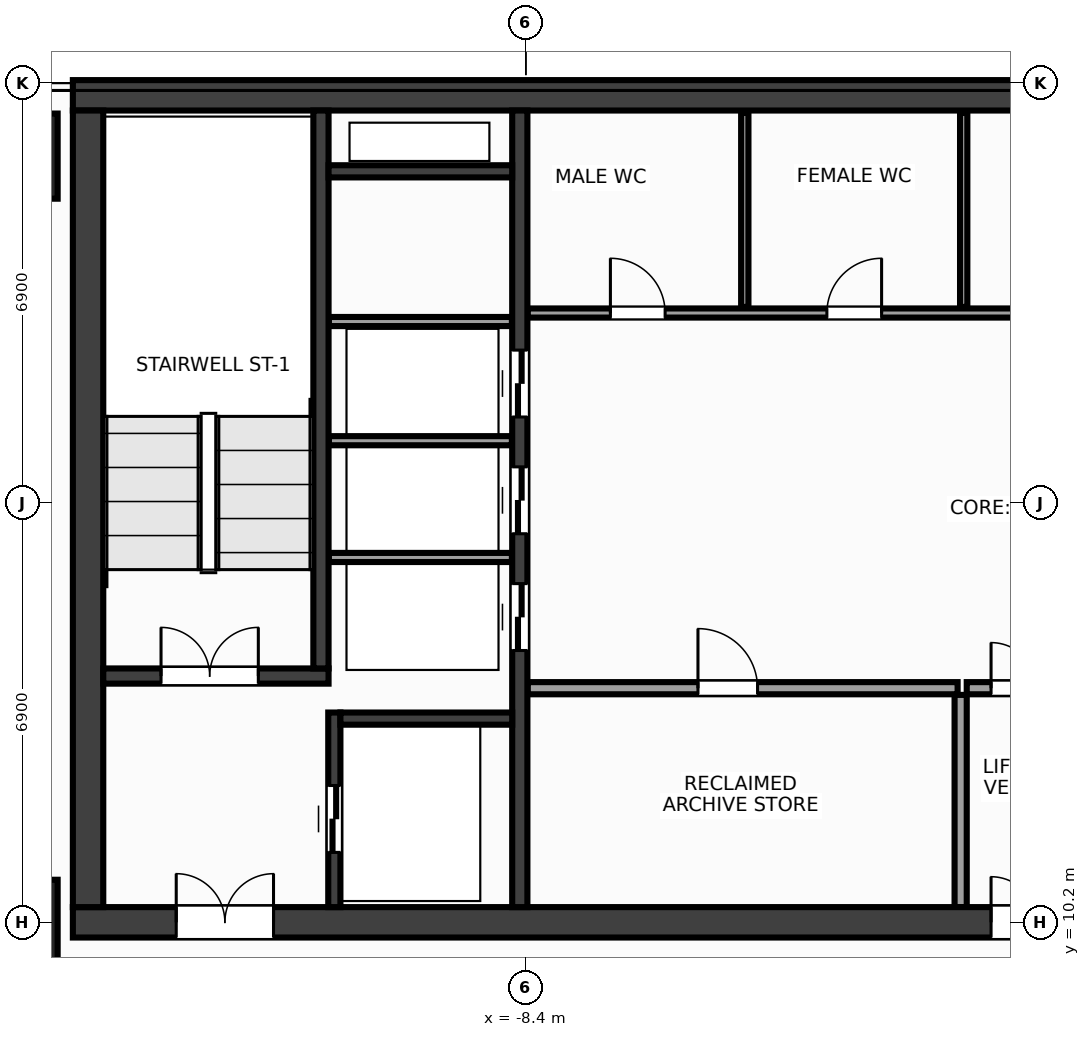
"""IFC4 building model, lengths in metres.
Left out: names, types, materials, properties, quantities, classifications, styles, units other than length and angle.
Written with IfcOpenShell. Run it as: python <this file> out.ifc"""

import sys

from ifc_helpers import new_model, si_unit, direction, frame, frame_2d, origin, origin_2d, place, context, subcontext, project, spatial, rectangle, extrude, source, transform, mapped, element, fill, save


model = new_model("IFC4")
c1 = context("Model", 3, precision=1e-05, world=origin(), true_north=direction((0.0, 1.0)))
c2 = subcontext(c1, "Body", "Model", "MODEL_VIEW")
j1 = project(units=[si_unit("LENGTHUNIT", "METRE"), si_unit("PLANEANGLEUNIT", "RADIAN")], contexts=[c1])
p1 = place(None, origin())
s1 = spatial("IfcSite", under=j1, at=p1, CompositionType="ELEMENT")
p2 = place(p1, origin())
s2 = spatial("IfcBuilding", under=s1, at=p2, CompositionType="ELEMENT")
p3 = place(p2, frame((0.0, 0.0, 196.4)))
s3 = spatial("IfcBuildingStorey", under=s2, at=p3, CompositionType="ELEMENT", Elevation=196.4)
m1 = source(origin(), c2, "Body", "SweptSolid", [
    extrude(rectangle(XDim=31.7, YDim=0.5, at=frame_2d((15.85, 0.0))), origin(), (0.0, 0.0, 1.0), 3.6),
])
p4 = place(p3, frame((-15.85, 23.8, 0.0), z_axis=(0.0, 0.0, 1.0), x_axis=(1.0, 0.0, 0.0)))
e1 = element("IfcWall", 1, at=p4, inside=s3, PredefinedType="SHEAR", context=c2, shape_type="MappedRepresentation", body=[
    mapped(m1, transform((0.0, 0.0, 0.0), x_axis=(1.0, 0.0, 0.0), y_axis=(0.0, 1.0, 0.0), z_axis=(0.0, 0.0, 1.0), scale=1.0)),
])
p5 = place(p3, frame((-15.85, 10.2, 0.0), z_axis=(0.0, 0.0, 1.0), x_axis=(1.0, 0.0, 0.0)))
e2 = element("IfcWall", 2, at=p5, inside=s3, PredefinedType="SHEAR", context=c2, shape_type="MappedRepresentation", body=[
    mapped(m1, transform((0.0, 0.0, 0.0), x_axis=(1.0, 0.0, 0.0), y_axis=(0.0, 1.0, 0.0), z_axis=(0.0, 0.0, 1.0), scale=1.0)),
])
p6 = place(p5, frame((1.7, 0.0, 0.0)))
e3 = element("IfcOpeningElement", 3, at=p6, cuts=e2, PredefinedType="OPENING", context=c2, shape_type="SweptSolid", body=[
    extrude(rectangle(XDim=1.6, YDim=2.15, at=frame_2d((0.8, 1.075))), frame((0.0, 0.262, 0.0), z_axis=(0.0, -1.0, 0.0), x_axis=(1.0, 0.0, 0.0)), (0.0, 0.0, 1.0), 0.524),
])
p7 = place(p5, frame((28.4, 0.0, 0.0)))
e4 = element("IfcOpeningElement", 4, at=p7, cuts=e2, PredefinedType="OPENING", context=c2, shape_type="SweptSolid", body=[
    extrude(rectangle(XDim=1.6, YDim=2.15, at=frame_2d((0.8, 1.075))), frame((0.0, 0.262, 0.0), z_axis=(0.0, -1.0, 0.0), x_axis=(1.0, 0.0, 0.0)), (0.0, 0.0, 1.0), 0.524),
])
p8 = place(p5, frame((15.1, 0.0, 0.0)))
e5 = element("IfcOpeningElement", 5, at=p8, cuts=e2, PredefinedType="OPENING", context=c2, shape_type="SweptSolid", body=[
    extrude(rectangle(XDim=1.5, YDim=2.2, at=frame_2d((0.75, 1.1))), frame((0.0, 0.262, 0.0), z_axis=(0.0, -1.0, 0.0), x_axis=(1.0, 0.0, 0.0)), (0.0, 0.0, 1.0), 0.524),
])
m2 = source(origin(), c2, "Body", "SweptSolid", [
    extrude(rectangle(XDim=13.1, YDim=0.5, at=frame_2d((6.55, 0.0))), origin(), (0.0, 0.0, 1.0), 3.6),
])
p9 = place(p3, frame((-15.6, 10.45, 0.0), z_axis=(0.0, 0.0, 1.0), x_axis=(0.0, 1.0, 0.0)))
e6 = element("IfcWall", 6, at=p9, inside=s3, PredefinedType="SHEAR", context=c2, shape_type="MappedRepresentation", body=[
    mapped(m2, transform((0.0, 0.0, 0.0), x_axis=(1.0, 0.0, 0.0), y_axis=(0.0, 1.0, 0.0), z_axis=(0.0, 0.0, 1.0), scale=1.0)),
])
m3 = source(origin(), c2, "Body", "SweptSolid", [
    extrude(rectangle(XDim=13.1, YDim=0.25, at=frame_2d((6.55, 0.0))), origin(), (0.0, 0.0, 1.0), 3.6),
])
p10 = place(p3, frame((-8.5, 10.45, 0.0), z_axis=(0.0, 0.0, 1.0), x_axis=(0.0, 1.0, 0.0)))
e7 = element("IfcWall", 7, at=p10, inside=s3, PredefinedType="SHEAR", context=c2, shape_type="MappedRepresentation", body=[
    mapped(m3, transform((0.0, 0.0, 0.0), x_axis=(1.0, 0.0, 0.0), y_axis=(0.0, 1.0, 0.0), z_axis=(0.0, 0.0, 1.0), scale=1.0)),
])
p11 = place(p10, frame((4.22, 0.0, 0.0)))
e8 = element("IfcOpeningElement", 8, at=p11, cuts=e7, PredefinedType="OPENING", context=c2, shape_type="SweptSolid", body=[
    extrude(rectangle(XDim=1.1, YDim=2.15, at=frame_2d((0.55, 1.075))), frame((0.0, 0.137, 0.0), z_axis=(0.0, -1.0, 0.0), x_axis=(1.0, 0.0, 0.0)), (0.0, 0.0, 1.0), 0.274),
])
p12 = place(p10, frame((6.14, 0.0, 0.0)))
e9 = element("IfcOpeningElement", 9, at=p12, cuts=e7, PredefinedType="OPENING", context=c2, shape_type="SweptSolid", body=[
    extrude(rectangle(XDim=1.1, YDim=2.15, at=frame_2d((0.55, 1.075))), frame((0.0, 0.137, 0.0), z_axis=(0.0, -1.0, 0.0), x_axis=(1.0, 0.0, 0.0)), (0.0, 0.0, 1.0), 0.274),
])
p13 = place(p10, frame((8.06, 0.0, 0.0)))
e10 = element("IfcOpeningElement", 10, at=p13, cuts=e7, PredefinedType="OPENING", context=c2, shape_type="SweptSolid", body=[
    extrude(rectangle(XDim=1.1, YDim=2.15, at=frame_2d((0.55, 1.075))), frame((0.0, 0.137, 0.0), z_axis=(0.0, -1.0, 0.0), x_axis=(1.0, 0.0, 0.0)), (0.0, 0.0, 1.0), 0.274),
])
m4 = source(origin(), c2, "Body", "SweptSolid", [
    extrude(rectangle(XDim=3.705, YDim=0.25, at=frame_2d((1.853, 0.0))), origin(), (0.0, 0.0, 1.0), 3.6),
])
p14 = place(p3, frame((-15.35, 14.25, 0.0), z_axis=(0.0, 0.0, 1.0), x_axis=(1.0, 0.0, 0.0)))
e11 = element("IfcWall", 11, at=p14, inside=s3, PredefinedType="SHEAR", context=c2, shape_type="MappedRepresentation", body=[
    mapped(m4, transform((0.0, 0.0, 0.0), x_axis=(1.0, 0.0, 0.0), y_axis=(0.0, 1.0, 0.0), z_axis=(0.0, 0.0, 1.0), scale=1.0)),
])
p15 = place(p14, frame((0.95, 0.0, 0.0)))
e12 = element("IfcOpeningElement", 12, at=p15, cuts=e11, PredefinedType="OPENING", context=c2, shape_type="SweptSolid", body=[
    extrude(rectangle(XDim=1.6, YDim=2.15, at=frame_2d((0.8, 1.075))), frame((0.0, 0.137, 0.0), z_axis=(0.0, -1.0, 0.0), x_axis=(1.0, 0.0, 0.0)), (0.0, 0.0, 1.0), 0.274),
])
m5 = source(origin(), c2, "Body", "SweptSolid", [
    extrude(rectangle(XDim=9.175, YDim=0.25, at=frame_2d((4.587, 0.0))), origin(), (0.0, 0.0, 1.0), 3.6),
])
p16 = place(p3, frame((-11.77, 14.375, 0.0), z_axis=(0.0, 0.0, 1.0), x_axis=(0.0, 1.0, 0.0)))
e13 = element("IfcWall", 13, at=p16, inside=s3, PredefinedType="SHEAR", context=c2, shape_type="MappedRepresentation", body=[
    mapped(m5, transform((0.0, 0.0, 0.0), x_axis=(1.0, 0.0, 0.0), y_axis=(0.0, 1.0, 0.0), z_axis=(0.0, 0.0, 1.0), scale=1.0)),
])
m6 = source(origin(), c2, "Body", "SweptSolid", [
    extrude(rectangle(XDim=3.2, YDim=0.2, at=frame_2d((1.6, 0.0))), origin(), (0.0, 0.0, 1.0), 3.6),
])
p17 = place(p3, frame((-11.55, 10.45, 0.0), z_axis=(0.0, 0.0, 1.0), x_axis=(0.0, 1.0, 0.0)))
e14 = element("IfcWall", 14, at=p17, inside=s3, PredefinedType="SHEAR", context=c2, shape_type="MappedRepresentation", body=[
    mapped(m6, transform((0.0, 0.0, 0.0), x_axis=(1.0, 0.0, 0.0), y_axis=(0.0, 1.0, 0.0), z_axis=(0.0, 0.0, 1.0), scale=1.0)),
])
p18 = place(p17, frame((0.9, 0.0, 0.0)))
e15 = element("IfcOpeningElement", 15, at=p18, cuts=e14, PredefinedType="OPENING", context=c2, shape_type="SweptSolid", body=[
    extrude(rectangle(XDim=1.1, YDim=2.15, at=frame_2d((0.55, 1.075))), frame((0.0, 0.112, 0.0), z_axis=(0.0, -1.0, 0.0), x_axis=(1.0, 0.0, 0.0)), (0.0, 0.0, 1.0), 0.224),
])
m7 = source(origin(), c2, "Body", "SweptSolid", [
    extrude(rectangle(XDim=2.825, YDim=0.2, at=frame_2d((1.413, 0.0))), origin(), (0.0, 0.0, 1.0), 3.6),
])
p19 = place(p3, frame((-11.45, 13.55, 0.0), z_axis=(0.0, 0.0, 1.0), x_axis=(1.0, 0.0, 0.0)))
e16 = element("IfcWall", 16, at=p19, inside=s3, PredefinedType="SHEAR", context=c2, shape_type="MappedRepresentation", body=[
    mapped(m7, transform((0.0, 0.0, 0.0), x_axis=(1.0, 0.0, 0.0), y_axis=(0.0, 1.0, 0.0), z_axis=(0.0, 0.0, 1.0), scale=1.0)),
])
m8 = source(origin(), c2, "Body", "SweptSolid", [
    extrude(rectangle(XDim=3.02, YDim=0.2, at=frame_2d((1.51, 0.0))), origin(), (0.0, 0.0, 1.0), 3.6),
])
p20 = place(p3, frame((-11.645, 22.55, 0.0), z_axis=(0.0, 0.0, 1.0), x_axis=(1.0, 0.0, 0.0)))
e17 = element("IfcWall", 17, at=p20, inside=s3, PredefinedType="SHEAR", context=c2, shape_type="MappedRepresentation", body=[
    mapped(m8, transform((0.0, 0.0, 0.0), x_axis=(1.0, 0.0, 0.0), y_axis=(0.0, 1.0, 0.0), z_axis=(0.0, 0.0, 1.0), scale=1.0)),
])
m9 = source(origin(), c2, "Body", "SweptSolid", [
    extrude(rectangle(XDim=1.4, YDim=1.4, at=origin_2d()), origin(), (0.0, 0.0, 1.0), 3.6),
])
for number, where, z_axis, x_axis in (
    (18, (-16.8, 10.2, 0.0), (0.0, 0.0, 1.0), (1.0, 0.0, 0.0)),
    (19, (-16.8, 22.8, 0.0), (0.0, 0.0, 1.0), (1.0, 0.0, 0.0)),
):
    element("IfcColumn", number, at=place(p3, frame(where, z_axis=z_axis, x_axis=x_axis)), inside=s3, PredefinedType="COLUMN", context=c2, shape_type="MappedRepresentation", body=[
        mapped(m9, transform((0.0, 0.0, 0.0), x_axis=(1.0, 0.0, 0.0), y_axis=(0.0, 1.0, 0.0), z_axis=(0.0, 0.0, 1.0), scale=1.0)),
    ])
m10 = source(origin(), c2, "Body", "SweptSolid", [
    extrude(rectangle(XDim=3.01, YDim=0.15, at=frame_2d((1.505, 0.0))), origin(), (0.0, 0.0, 1.0), 3.38),
])
for number, where, z_axis, x_axis in (
    (20, (-11.64, 16.2, 0.0), (0.0, 0.0, 1.0), (1.0, 0.0, 0.0)),
    (21, (-11.64, 18.12, 0.0), (0.0, 0.0, 1.0), (1.0, 0.0, 0.0)),
    (22, (-11.64, 20.08, 0.0), (0.0, 0.0, 1.0), (1.0, 0.0, 0.0)),
):
    element("IfcWall", number, at=place(p3, frame(where, z_axis=z_axis, x_axis=x_axis)), inside=s3, PredefinedType="PARTITIONING", context=c2, shape_type="MappedRepresentation", body=[
        mapped(m10, transform((0.0, 0.0, 0.0), x_axis=(1.0, 0.0, 0.0), y_axis=(0.0, 1.0, 0.0), z_axis=(0.0, 0.0, 1.0), scale=1.0)),
    ])
m11 = source(origin(), c2, "Body", "SweptSolid", [
    extrude(rectangle(XDim=7.07, YDim=0.2, at=frame_2d((3.535, 0.0))), origin(), (0.0, 0.0, 1.0), 3.38),
])
p21 = place(p3, frame((-8.37, 14.05, 0.0), z_axis=(0.0, 0.0, 1.0), x_axis=(1.0, 0.0, 0.0)))
e23 = element("IfcWall", 23, at=p21, inside=s3, PredefinedType="PARTITIONING", context=c2, shape_type="MappedRepresentation", body=[
    mapped(m11, transform((0.0, 0.0, 0.0), x_axis=(1.0, 0.0, 0.0), y_axis=(0.0, 1.0, 0.0), z_axis=(0.0, 0.0, 1.0), scale=1.0)),
])
p22 = place(p21, frame((2.8, 0.0, 0.0)))
e24 = element("IfcOpeningElement", 24, at=p22, cuts=e23, PredefinedType="OPENING", context=c2, shape_type="SweptSolid", body=[
    extrude(rectangle(XDim=0.98, YDim=2.15, at=frame_2d((0.49, 1.075))), frame((0.0, 0.112, 0.0), z_axis=(0.0, -1.0, 0.0), x_axis=(1.0, 0.0, 0.0)), (0.0, 0.0, 1.0), 0.224),
])
m12 = source(origin(), c2, "Body", "SweptSolid", [
    extrude(rectangle(XDim=3.49, YDim=0.2, at=frame_2d((1.745, 0.0))), origin(), (0.0, 0.0, 1.0), 3.38),
])
p23 = place(p3, frame((-1.25, 10.45, 0.0), z_axis=(0.0, 0.0, 1.0), x_axis=(0.0, 1.0, 0.0)))
e25 = element("IfcWall", 25, at=p23, inside=s3, PredefinedType="PARTITIONING", context=c2, shape_type="MappedRepresentation", body=[
    mapped(m12, transform((0.0, 0.0, 0.0), x_axis=(1.0, 0.0, 0.0), y_axis=(0.0, 1.0, 0.0), z_axis=(0.0, 0.0, 1.0), scale=1.0)),
])
m13 = source(origin(), c2, "Body", "SweptSolid", [
    extrude(rectangle(XDim=2.3, YDim=0.2, at=frame_2d((1.15, 0.0))), origin(), (0.0, 0.0, 1.0), 3.38),
])
p24 = place(p3, frame((-1.15, 14.05, 0.0), z_axis=(0.0, 0.0, 1.0), x_axis=(1.0, 0.0, 0.0)))
e26 = element("IfcWall", 26, at=p24, inside=s3, PredefinedType="PARTITIONING", context=c2, shape_type="MappedRepresentation", body=[
    mapped(m13, transform((0.0, 0.0, 0.0), x_axis=(1.0, 0.0, 0.0), y_axis=(0.0, 1.0, 0.0), z_axis=(0.0, 0.0, 1.0), scale=1.0)),
])
p25 = place(p24, frame((0.4, 0.0, 0.0)))
e27 = element("IfcOpeningElement", 27, at=p25, cuts=e26, PredefinedType="OPENING", context=c2, shape_type="SweptSolid", body=[
    extrude(rectangle(XDim=1.5, YDim=2.2, at=frame_2d((0.75, 1.1))), frame((0.0, 0.112, 0.0), z_axis=(0.0, -1.0, 0.0), x_axis=(1.0, 0.0, 0.0)), (0.0, 0.0, 1.0), 0.224),
])
m14 = source(origin(), c2, "Body", "SweptSolid", [
    extrude(rectangle(XDim=14.59, YDim=0.15, at=frame_2d((7.295, 0.0))), origin(), (0.0, 0.0, 1.0), 3.38),
])
p26 = place(p3, frame((-8.37, 20.22, 0.0), z_axis=(0.0, 0.0, 1.0), x_axis=(1.0, 0.0, 0.0)))
e28 = element("IfcWall", 28, at=p26, inside=s3, PredefinedType="PARTITIONING", context=c2, shape_type="MappedRepresentation", body=[
    mapped(m14, transform((0.0, 0.0, 0.0), x_axis=(1.0, 0.0, 0.0), y_axis=(0.0, 1.0, 0.0), z_axis=(0.0, 0.0, 1.0), scale=1.0)),
])
p27 = place(p26, frame((1.36, 0.0, 0.0)))
e29 = element("IfcOpeningElement", 29, at=p27, cuts=e28, PredefinedType="OPENING", context=c2, shape_type="SweptSolid", body=[
    extrude(rectangle(XDim=0.9, YDim=2.15, at=frame_2d((0.45, 1.075))), frame((0.0, 0.087, 0.0), z_axis=(0.0, -1.0, 0.0), x_axis=(1.0, 0.0, 0.0)), (0.0, 0.0, 1.0), 0.174),
])
p28 = place(p26, frame((4.92, 0.0, 0.0)))
e30 = element("IfcOpeningElement", 30, at=p28, cuts=e28, PredefinedType="OPENING", context=c2, shape_type="SweptSolid", body=[
    extrude(rectangle(XDim=0.9, YDim=2.15, at=frame_2d((0.45, 1.075))), frame((0.0, 0.087, 0.0), z_axis=(0.0, -1.0, 0.0), x_axis=(1.0, 0.0, 0.0)), (0.0, 0.0, 1.0), 0.174),
])
p29 = place(p26, frame((10.37, 0.0, 0.0)))
e31 = element("IfcOpeningElement", 31, at=p29, cuts=e28, PredefinedType="OPENING", context=c2, shape_type="SweptSolid", body=[
    extrude(rectangle(XDim=0.9, YDim=2.15, at=frame_2d((0.45, 1.075))), frame((0.0, 0.087, 0.0), z_axis=(0.0, -1.0, 0.0), x_axis=(1.0, 0.0, 0.0)), (0.0, 0.0, 1.0), 0.174),
])
m15 = source(origin(), c2, "Body", "SweptSolid", [
    extrude(rectangle(XDim=3.19, YDim=0.12, at=frame_2d((1.595, 0.0))), origin(), (0.0, 0.0, 1.0), 3.38),
])
for number, where, z_axis, x_axis in (
    (32, (-4.8, 20.32, 0.0), (0.0, 0.0, 1.0), (0.0, 1.0, 0.0)),
    (33, (-1.2, 20.32, 0.0), (0.0, 0.0, 1.0), (0.0, 1.0, 0.0)),
):
    element("IfcWall", number, at=place(p3, frame(where, z_axis=z_axis, x_axis=x_axis)), inside=s3, PredefinedType="PARTITIONING", context=c2, shape_type="MappedRepresentation", body=[
        mapped(m15, transform((0.0, 0.0, 0.0), x_axis=(1.0, 0.0, 0.0), y_axis=(0.0, 1.0, 0.0), z_axis=(0.0, 0.0, 1.0), scale=1.0)),
    ])
m16 = source(origin(), c2, "Body", "SweptSolid", [
    extrude(rectangle(XDim=1.6, YDim=2.15, at=frame_2d((0.8, 1.075))), frame((0.0, 0.025, 0.0), z_axis=(0.0, -1.0, 0.0), x_axis=(1.0, 0.0, 0.0)), (0.0, 0.0, 1.0), 0.05),
])
p30 = place(p15, origin())
e34 = element("IfcDoor", 34, at=p30, inside=s3, OperationType="DOUBLE_DOOR_SINGLE_SWING", PredefinedType="DOOR", context=c2, shape_type="MappedRepresentation", body=[
    mapped(m16, transform((0.0, 0.0, 0.0), x_axis=(1.0, 0.0, 0.0), y_axis=(0.0, 1.0, 0.0), z_axis=(0.0, 0.0, 1.0), scale=1.0)),
])
fill(e12, e34)
p31 = place(p6, origin())
e35 = element("IfcDoor", 35, at=p31, inside=s3, OperationType="DOUBLE_DOOR_SINGLE_SWING", PredefinedType="DOOR", context=c2, shape_type="MappedRepresentation", body=[
    mapped(m16, transform((0.0, 0.0, 0.0), x_axis=(1.0, 0.0, 0.0), y_axis=(0.0, 1.0, 0.0), z_axis=(0.0, 0.0, 1.0), scale=1.0)),
])
fill(e3, e35)
m17 = source(origin(), c2, "Body", "SweptSolid", [
    extrude(rectangle(XDim=1.1, YDim=2.15, at=frame_2d((0.55, 1.075))), frame((0.0, 0.025, 0.0), z_axis=(0.0, -1.0, 0.0), x_axis=(1.0, 0.0, 0.0)), (0.0, 0.0, 1.0), 0.05),
])
p32 = place(p18, origin())
e36 = element("IfcDoor", 36, at=p32, inside=s3, OperationType="DOUBLE_DOOR_SLIDING", PredefinedType="DOOR", context=c2, shape_type="MappedRepresentation", body=[
    mapped(m17, transform((0.0, 0.0, 0.0), x_axis=(1.0, 0.0, 0.0), y_axis=(0.0, 1.0, 0.0), z_axis=(0.0, 0.0, 1.0), scale=1.0)),
])
fill(e15, e36)
p33 = place(p11, origin())
e37 = element("IfcDoor", 37, at=p33, inside=s3, OperationType="DOUBLE_DOOR_SLIDING", PredefinedType="DOOR", context=c2, shape_type="MappedRepresentation", body=[
    mapped(m17, transform((0.0, 0.0, 0.0), x_axis=(1.0, 0.0, 0.0), y_axis=(0.0, 1.0, 0.0), z_axis=(0.0, 0.0, 1.0), scale=1.0)),
])
fill(e8, e37)
p34 = place(p12, origin())
e38 = element("IfcDoor", 38, at=p34, inside=s3, OperationType="DOUBLE_DOOR_SLIDING", PredefinedType="DOOR", context=c2, shape_type="MappedRepresentation", body=[
    mapped(m17, transform((0.0, 0.0, 0.0), x_axis=(1.0, 0.0, 0.0), y_axis=(0.0, 1.0, 0.0), z_axis=(0.0, 0.0, 1.0), scale=1.0)),
])
fill(e9, e38)
p35 = place(p13, origin())
e39 = element("IfcDoor", 39, at=p35, inside=s3, OperationType="DOUBLE_DOOR_SLIDING", PredefinedType="DOOR", context=c2, shape_type="MappedRepresentation", body=[
    mapped(m17, transform((0.0, 0.0, 0.0), x_axis=(1.0, 0.0, 0.0), y_axis=(0.0, 1.0, 0.0), z_axis=(0.0, 0.0, 1.0), scale=1.0)),
])
fill(e10, e39)
m18 = source(origin(), c2, "Body", "SweptSolid", [
    extrude(rectangle(XDim=0.98, YDim=2.15, at=frame_2d((0.49, 1.075))), frame((0.0, 0.025, 0.0), z_axis=(0.0, -1.0, 0.0), x_axis=(1.0, 0.0, 0.0)), (0.0, 0.0, 1.0), 0.05),
])
p36 = place(p22, origin())
e40 = element("IfcDoor", 40, at=p36, inside=s3, OperationType="SINGLE_SWING_LEFT", PredefinedType="DOOR", context=c2, shape_type="MappedRepresentation", body=[
    mapped(m18, transform((0.0, 0.0, 0.0), x_axis=(1.0, 0.0, 0.0), y_axis=(0.0, 1.0, 0.0), z_axis=(0.0, 0.0, 1.0), scale=1.0)),
])
fill(e24, e40)
m19 = source(origin(), c2, "Body", "SweptSolid", [
    extrude(rectangle(XDim=1.5, YDim=2.2, at=frame_2d((0.75, 1.1))), frame((0.0, 0.025, 0.0), z_axis=(0.0, -1.0, 0.0), x_axis=(1.0, 0.0, 0.0)), (0.0, 0.0, 1.0), 0.05),
])
p37 = place(p25, origin())
e41 = element("IfcDoor", 41, at=p37, inside=s3, OperationType="DOUBLE_DOOR_SINGLE_SWING", PredefinedType="DOOR", context=c2, shape_type="MappedRepresentation", body=[
    mapped(m19, transform((0.0, 0.0, 0.0), x_axis=(1.0, 0.0, 0.0), y_axis=(0.0, 1.0, 0.0), z_axis=(0.0, 0.0, 1.0), scale=1.0)),
])
fill(e27, e41)
p38 = place(p8, origin())
e42 = element("IfcDoor", 42, at=p38, inside=s3, OperationType="DOUBLE_DOOR_SINGLE_SWING", PredefinedType="DOOR", context=c2, shape_type="MappedRepresentation", body=[
    mapped(m19, transform((0.0, 0.0, 0.0), x_axis=(1.0, 0.0, 0.0), y_axis=(0.0, 1.0, 0.0), z_axis=(0.0, 0.0, 1.0), scale=1.0)),
])
fill(e5, e42)
m20 = source(origin(), c2, "Body", "SweptSolid", [
    extrude(rectangle(XDim=0.9, YDim=2.15, at=frame_2d((0.45, 1.075))), frame((0.0, 0.025, 0.0), z_axis=(0.0, -1.0, 0.0), x_axis=(1.0, 0.0, 0.0)), (0.0, 0.0, 1.0), 0.05),
])
p39 = place(p27, origin())
e43 = element("IfcDoor", 43, at=p39, inside=s3, OperationType="SINGLE_SWING_LEFT", PredefinedType="DOOR", context=c2, shape_type="MappedRepresentation", body=[
    mapped(m20, transform((0.0, 0.0, 0.0), x_axis=(1.0, 0.0, 0.0), y_axis=(0.0, 1.0, 0.0), z_axis=(0.0, 0.0, 1.0), scale=1.0)),
])
fill(e29, e43)
p40 = place(p28, origin())
e44 = element("IfcDoor", 44, at=p40, inside=s3, OperationType="SINGLE_SWING_RIGHT", PredefinedType="DOOR", context=c2, shape_type="MappedRepresentation", body=[
    mapped(m20, transform((0.0, 0.0, 0.0), x_axis=(1.0, 0.0, 0.0), y_axis=(0.0, 1.0, 0.0), z_axis=(0.0, 0.0, 1.0), scale=1.0)),
])
fill(e30, e44)
save(model, sys.argv[1])
